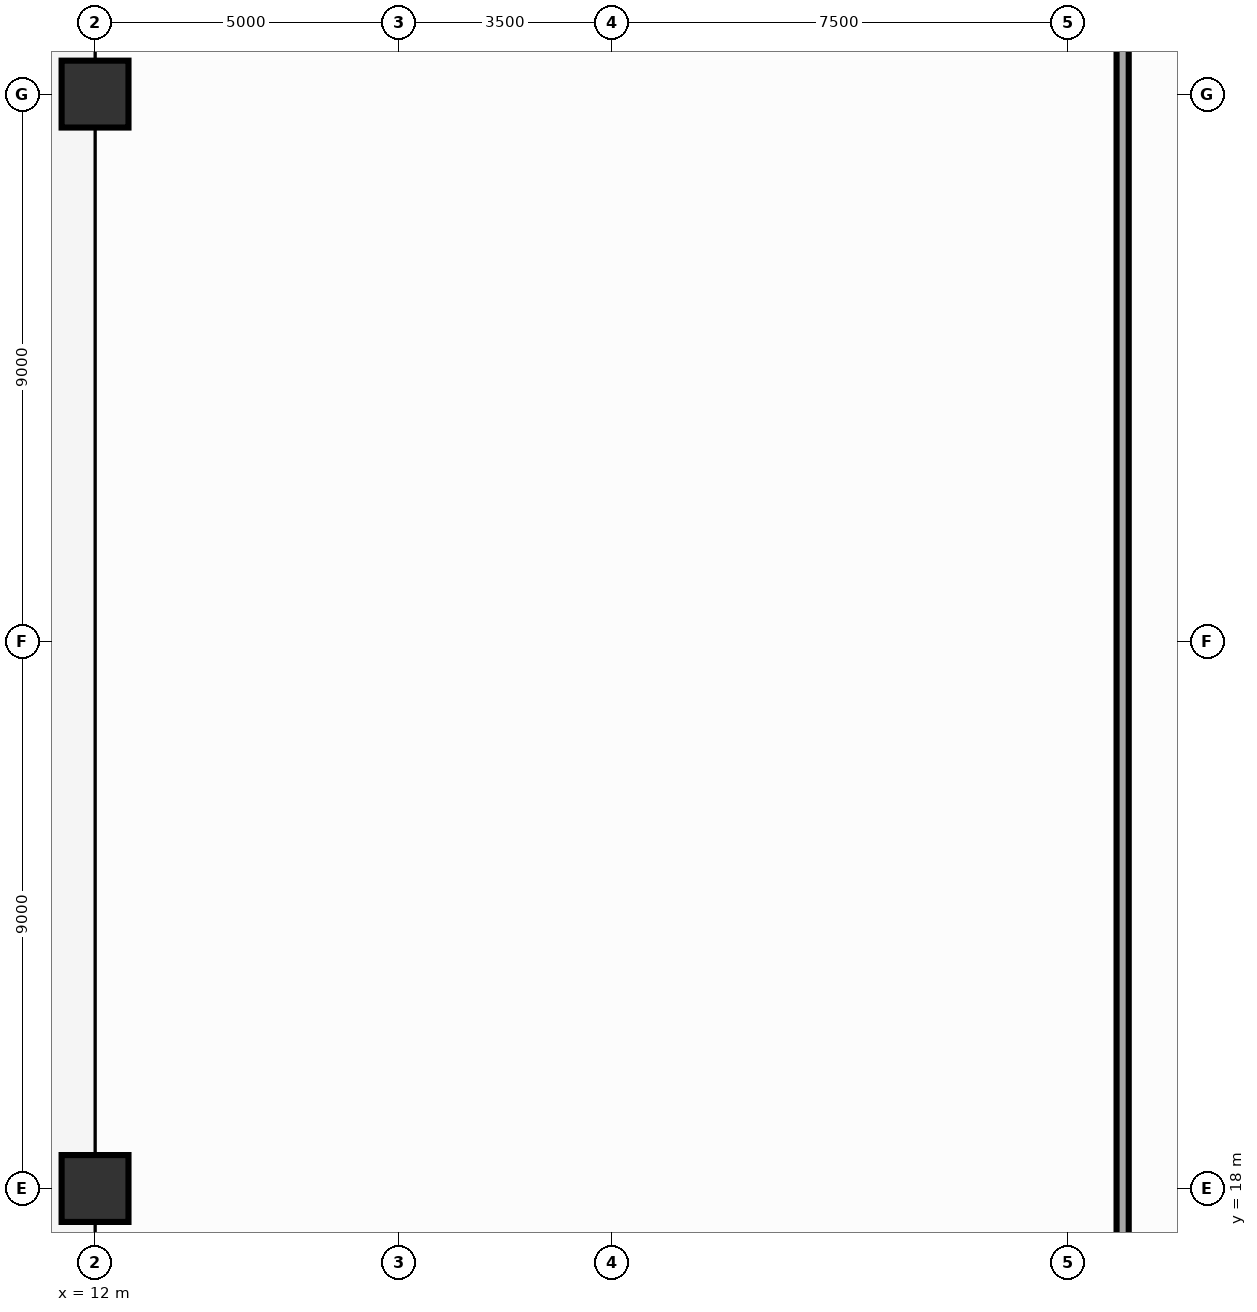
"""IFC4 building model, lengths in metres.
Left out: names, types, materials, properties, quantities, classifications, styles, units other than length and angle.
Written with IfcOpenShell. Run it as: python <this file> out.ifc"""

import sys

from ifc_helpers import new_model, si_unit, direction, frame, frame_2d, origin, origin_2d, place, context, subcontext, project, spatial, rectangle, extrude, source, transform, mapped, element, fill, save


model = new_model("IFC4")
c1 = context("Model", 3, precision=1e-05, world=origin(), true_north=direction((0.0, 1.0)))
c2 = subcontext(c1, "Body", "Model", "MODEL_VIEW")
j1 = project(units=[si_unit("LENGTHUNIT", "METRE"), si_unit("PLANEANGLEUNIT", "RADIAN")], contexts=[c1])
p1 = place(None, origin())
s1 = spatial("IfcSite", under=j1, at=p1, CompositionType="ELEMENT")
p2 = place(p1, origin())
s2 = spatial("IfcBuilding", under=s1, at=p2, CompositionType="ELEMENT")
p3 = place(p2, frame((0.0, 0.0, 70.4)))
s3 = spatial("IfcBuildingStorey", under=s2, at=p3, CompositionType="ELEMENT", Elevation=70.4)
m1 = source(origin(), c2, "Body", "SweptSolid", [
    extrude(rectangle(XDim=1.1, YDim=1.1, at=origin_2d()), origin(), (0.0, 0.0, 1.0), 3.95),
])
for number, where, z_axis, x_axis in (
    (1, (12.0, 36.0, 0.0), (0.0, 0.0, 1.0), (1.0, 0.0, 0.0)),
    (2, (12.0, 18.0, 0.0), (0.0, 0.0, 1.0), (1.0, 0.0, 0.0)),
):
    element("IfcColumn", number, at=place(p3, frame(where, z_axis=z_axis, x_axis=x_axis)), inside=s3, PredefinedType="COLUMN", context=c2, shape_type="MappedRepresentation", body=[
        mapped(m1, transform((0.0, 0.0, 0.0), scale=1.0)),
    ])
p4 = place(p3, frame((28.9, 14.5, 0.0), z_axis=(0.0, 0.0, 1.0), x_axis=(0.0, 1.0, 0.0)))
e3 = element("IfcWall", 3, at=p4, inside=s3, PredefinedType="PARTITIONING", context=c2, shape_type="SweptSolid", body=[
    extrude(rectangle(XDim=24.8, YDim=0.2, at=frame_2d((12.4, 0.0))), origin(), (0.0, 0.0, 1.0), 3.61),
])
p5 = place(p4, frame((11.85, 0.0, 0.0)))
e4 = element("IfcOpeningElement", 4, at=p5, cuts=e3, PredefinedType="OPENING", context=c2, shape_type="SweptSolid", body=[
    extrude(rectangle(XDim=1.1, YDim=2.15, at=frame_2d((0.55, 1.075))), frame((0.0, 0.112, 0.0), z_axis=(0.0, -1.0, 0.0), x_axis=(1.0, 0.0, 0.0)), (0.0, 0.0, 1.0), 0.224),
])
m2 = source(origin(), c2, "Body", "SweptSolid", [
    extrude(rectangle(XDim=1.1, YDim=2.15, at=frame_2d((0.55, 1.075))), frame((0.0, 0.025, 0.0), z_axis=(0.0, -1.0, 0.0), x_axis=(1.0, 0.0, 0.0)), (0.0, 0.0, 1.0), 0.05),
])
p6 = place(p5, origin())
e5 = element("IfcDoor", 5, at=p6, inside=s3, OperationType="SINGLE_SWING_LEFT", PredefinedType="DOOR", context=c2, shape_type="MappedRepresentation", body=[
    mapped(m2, transform((0.0, 0.0, 0.0), scale=1.0)),
])
fill(e4, e5)
save(model, sys.argv[1])
